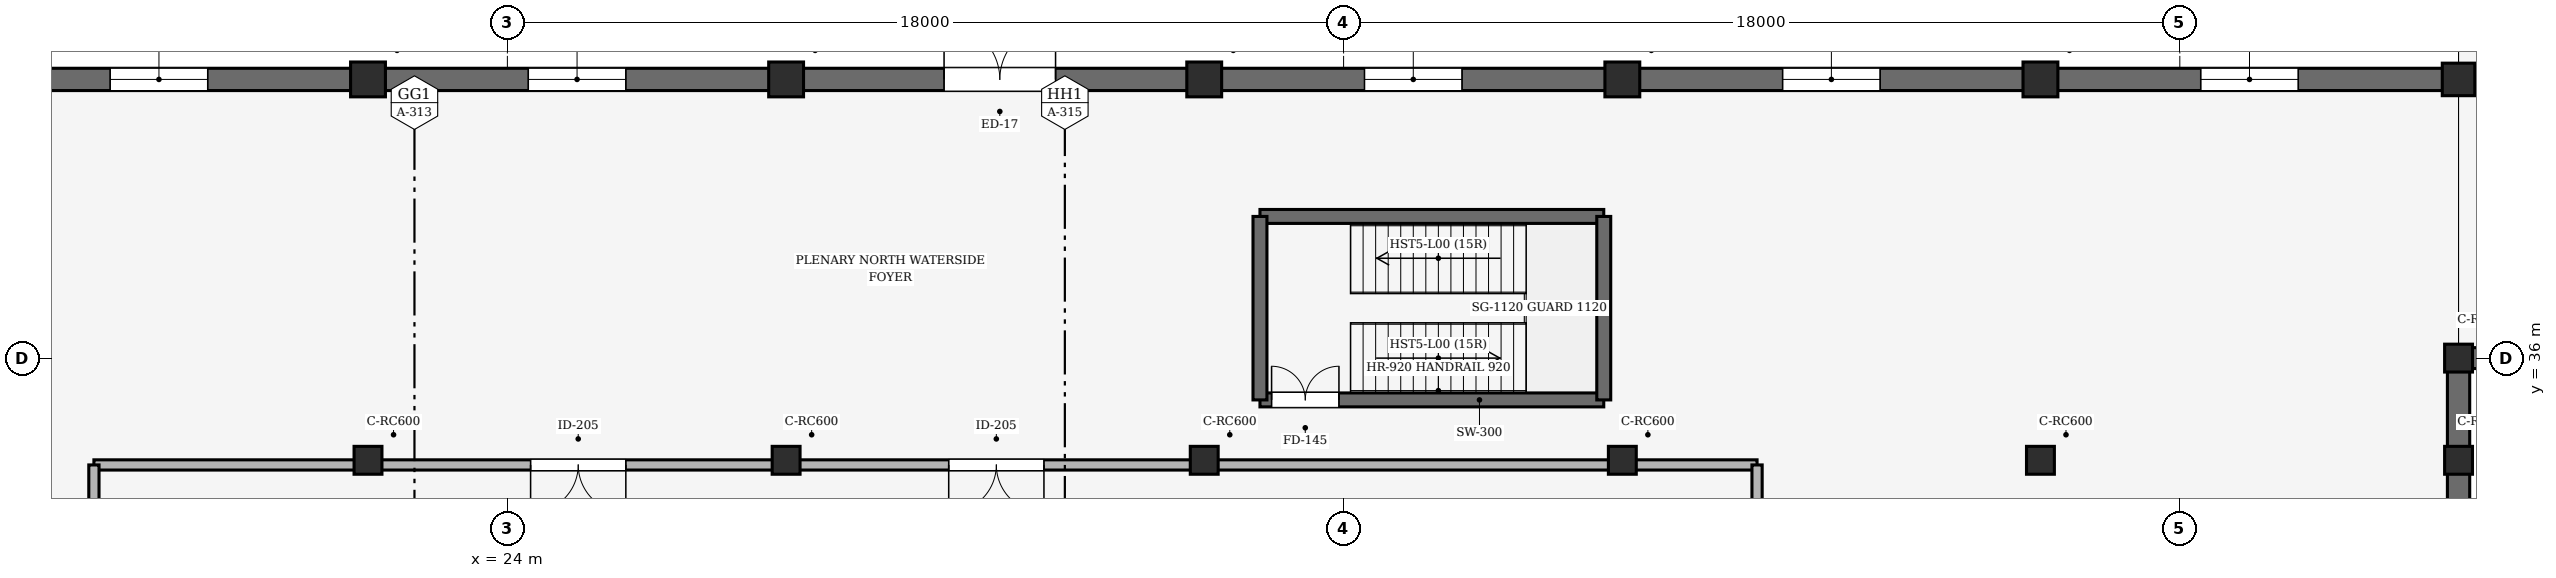
"""IFC4 building model, lengths in metres.
Left out: names, types, materials, properties, quantities, classifications, styles, units other than length and angle.
Written with IfcOpenShell. Run it as: python <this file> out.ifc"""

import sys

from ifc_helpers import new_model, si_unit, direction, frame, frame_2d, origin, origin_2d, place, context, subcontext, project, spatial, rectangle, extrude, element, fill, save


model = new_model("IFC4")
c1 = context("Model", 3, precision=1e-05, world=origin(), true_north=direction((0.0, 1.0)))
c2 = subcontext(c1, "Body", "Model", "MODEL_VIEW")
j1 = project(units=[si_unit("LENGTHUNIT", "METRE"), si_unit("PLANEANGLEUNIT", "RADIAN")], contexts=[c1])
p1 = place(None, origin())
s1 = spatial("IfcSite", under=j1, at=p1, CompositionType="ELEMENT")
p2 = place(p1, origin())
s2 = spatial("IfcBuilding", under=s1, at=p2, CompositionType="ELEMENT")
p3 = place(p2, origin())
s3 = spatial("IfcBuildingStorey", under=s2, at=p3, CompositionType="ELEMENT", Elevation=0.0)
p4 = place(p3, frame((21.0, 42.0, -0.44), z_axis=(0.0, 0.0, 1.0), x_axis=(1.0, 0.0, 0.0)))
e1 = element("IfcColumn", 1, at=p4, inside=s3, PredefinedType="COLUMN", context=c2, shape_type="SweptSolid", body=[
    extrude(rectangle(XDim=0.75, YDim=0.75, at=origin_2d()), origin(), (0.0, 0.0, 1.0), 5.84),
])
p5 = place(p3, frame((21.0, 33.8, -0.44), z_axis=(0.0, 0.0, 1.0), x_axis=(1.0, 0.0, 0.0)))
e2 = element("IfcColumn", 2, at=p5, inside=s3, PredefinedType="COLUMN", context=c2, shape_type="SweptSolid", body=[
    extrude(rectangle(XDim=0.6, YDim=0.6, at=origin_2d()), origin(), (0.0, 0.0, 1.0), 5.84),
])
p6 = place(p3, frame((30.0, 42.0, -0.44), z_axis=(0.0, 0.0, 1.0), x_axis=(1.0, 0.0, 0.0)))
e3 = element("IfcColumn", 3, at=p6, inside=s3, PredefinedType="COLUMN", context=c2, shape_type="SweptSolid", body=[
    extrude(rectangle(XDim=0.75, YDim=0.75, at=origin_2d()), origin(), (0.0, 0.0, 1.0), 5.84),
])
p7 = place(p3, frame((30.0, 33.8, -0.44), z_axis=(0.0, 0.0, 1.0), x_axis=(1.0, 0.0, 0.0)))
e4 = element("IfcColumn", 4, at=p7, inside=s3, PredefinedType="COLUMN", context=c2, shape_type="SweptSolid", body=[
    extrude(rectangle(XDim=0.6, YDim=0.6, at=origin_2d()), origin(), (0.0, 0.0, 1.0), 5.84),
])
p8 = place(p3, frame((39.0, 42.0, -0.44), z_axis=(0.0, 0.0, 1.0), x_axis=(1.0, 0.0, 0.0)))
e5 = element("IfcColumn", 5, at=p8, inside=s3, PredefinedType="COLUMN", context=c2, shape_type="SweptSolid", body=[
    extrude(rectangle(XDim=0.75, YDim=0.75, at=origin_2d()), origin(), (0.0, 0.0, 1.0), 5.84),
])
p9 = place(p3, frame((39.0, 33.8, -0.44), z_axis=(0.0, 0.0, 1.0), x_axis=(1.0, 0.0, 0.0)))
e6 = element("IfcColumn", 6, at=p9, inside=s3, PredefinedType="COLUMN", context=c2, shape_type="SweptSolid", body=[
    extrude(rectangle(XDim=0.6, YDim=0.6, at=origin_2d()), origin(), (0.0, 0.0, 1.0), 5.84),
])
p10 = place(p3, frame((48.0, 42.0, -0.44), z_axis=(0.0, 0.0, 1.0), x_axis=(1.0, 0.0, 0.0)))
e7 = element("IfcColumn", 7, at=p10, inside=s3, PredefinedType="COLUMN", context=c2, shape_type="SweptSolid", body=[
    extrude(rectangle(XDim=0.75, YDim=0.75, at=origin_2d()), origin(), (0.0, 0.0, 1.0), 5.84),
])
p11 = place(p3, frame((48.0, 33.8, -0.44), z_axis=(0.0, 0.0, 1.0), x_axis=(1.0, 0.0, 0.0)))
e8 = element("IfcColumn", 8, at=p11, inside=s3, PredefinedType="COLUMN", context=c2, shape_type="SweptSolid", body=[
    extrude(rectangle(XDim=0.6, YDim=0.6, at=origin_2d()), origin(), (0.0, 0.0, 1.0), 5.84),
])
p12 = place(p3, frame((57.0, 42.0, -0.44), z_axis=(0.0, 0.0, 1.0), x_axis=(1.0, 0.0, 0.0)))
e9 = element("IfcColumn", 9, at=p12, inside=s3, PredefinedType="COLUMN", context=c2, shape_type="SweptSolid", body=[
    extrude(rectangle(XDim=0.75, YDim=0.75, at=origin_2d()), origin(), (0.0, 0.0, 1.0), 5.84),
])
p13 = place(p3, frame((57.0, 33.8, -0.44), z_axis=(0.0, 0.0, 1.0), x_axis=(1.0, 0.0, 0.0)))
e10 = element("IfcColumn", 10, at=p13, inside=s3, PredefinedType="COLUMN", context=c2, shape_type="SweptSolid", body=[
    extrude(rectangle(XDim=0.6, YDim=0.6, at=origin_2d()), origin(), (0.0, 0.0, 1.0), 5.84),
])
p14 = place(p3, frame((66.0, 42.0, -0.44), z_axis=(0.0, 0.0, 1.0), x_axis=(1.0, 0.0, 0.0)))
e11 = element("IfcColumn", 11, at=p14, inside=s3, PredefinedType="COLUMN", context=c2, shape_type="SweptSolid", body=[
    extrude(rectangle(XDim=0.7, YDim=0.7, at=origin_2d()), origin(), (0.0, 0.0, 1.0), 5.84),
])
for number, where, z_axis, x_axis in (
    (12, (66.0, 33.8, -0.44), (0.0, 0.0, 1.0), (1.0, 0.0, 0.0)),
    (13, (66.0, 36.0, -0.44), (0.0, 0.0, 1.0), (1.0, 0.0, 0.0)),
):
    element("IfcColumn", number, at=place(p3, frame(where, z_axis=z_axis, x_axis=x_axis)), inside=s3, PredefinedType="COLUMN", context=c2, shape_type="SweptSolid", body=[
        extrude(rectangle(XDim=0.6, YDim=0.6, at=origin_2d()), origin(), (0.0, 0.0, 1.0), 5.84),
    ])
p15 = place(p3, frame((21.0, 42.0, 0.0), z_axis=(0.0, 0.0, 1.0), x_axis=(-1.0, 0.0, 0.0)))
e14 = element("IfcWall", 14, at=p15, inside=s3, PredefinedType="SOLIDWALL", context=c2, shape_type="SweptSolid", body=[
    extrude(rectangle(XDim=9.0, YDim=0.48, at=frame_2d((4.5, 0.0))), origin(), (0.0, 0.0, 1.0), 4.65),
])
p16 = place(p15, frame((3.45, 0.0, 0.9)))
e15 = element("IfcOpeningElement", 15, at=p16, cuts=e14, PredefinedType="OPENING", context=c2, shape_type="SweptSolid", body=[
    extrude(rectangle(XDim=2.1, YDim=2.95, at=frame_2d((1.05, 1.475))), frame((0.0, 0.25, 0.0), z_axis=(0.0, -1.0, 0.0), x_axis=(1.0, 0.0, 0.0)), (0.0, 0.0, 1.0), 0.5),
])
p17 = place(p3, frame((30.0, 42.0, 0.0), z_axis=(0.0, 0.0, 1.0), x_axis=(-1.0, 0.0, 0.0)))
e16 = element("IfcWall", 16, at=p17, inside=s3, PredefinedType="SOLIDWALL", context=c2, shape_type="SweptSolid", body=[
    extrude(rectangle(XDim=9.0, YDim=0.48, at=frame_2d((4.5, 0.0))), origin(), (0.0, 0.0, 1.0), 4.65),
])
p18 = place(p17, frame((3.45, 0.0, 0.9)))
e17 = element("IfcOpeningElement", 17, at=p18, cuts=e16, PredefinedType="OPENING", context=c2, shape_type="SweptSolid", body=[
    extrude(rectangle(XDim=2.1, YDim=2.95, at=frame_2d((1.05, 1.475))), frame((0.0, 0.25, 0.0), z_axis=(0.0, -1.0, 0.0), x_axis=(1.0, 0.0, 0.0)), (0.0, 0.0, 1.0), 0.5),
])
p19 = place(p3, frame((39.0, 42.0, 0.0), z_axis=(0.0, 0.0, 1.0), x_axis=(-1.0, 0.0, 0.0)))
e18 = element("IfcWall", 18, at=p19, inside=s3, PredefinedType="SOLIDWALL", context=c2, shape_type="SweptSolid", body=[
    extrude(rectangle(XDim=9.0, YDim=0.48, at=frame_2d((4.5, 0.0))), origin(), (0.0, 0.0, 1.0), 4.65),
])
p20 = place(p19, frame((3.2, 0.0, 0.0)))
e19 = element("IfcOpeningElement", 19, at=p20, cuts=e18, PredefinedType="OPENING", context=c2, shape_type="SweptSolid", body=[
    extrude(rectangle(XDim=2.4, YDim=2.65, at=frame_2d((1.2, 1.325))), frame((0.0, 0.25, 0.0), z_axis=(0.0, -1.0, 0.0), x_axis=(1.0, 0.0, 0.0)), (0.0, 0.0, 1.0), 0.5),
])
p21 = place(p3, frame((48.0, 42.0, 0.0), z_axis=(0.0, 0.0, 1.0), x_axis=(-1.0, 0.0, 0.0)))
e20 = element("IfcWall", 20, at=p21, inside=s3, PredefinedType="SOLIDWALL", context=c2, shape_type="SweptSolid", body=[
    extrude(rectangle(XDim=9.0, YDim=0.48, at=frame_2d((4.5, 0.0))), origin(), (0.0, 0.0, 1.0), 4.65),
])
p22 = place(p21, frame((3.45, 0.0, 0.9)))
e21 = element("IfcOpeningElement", 21, at=p22, cuts=e20, PredefinedType="OPENING", context=c2, shape_type="SweptSolid", body=[
    extrude(rectangle(XDim=2.1, YDim=2.95, at=frame_2d((1.05, 1.475))), frame((0.0, 0.25, 0.0), z_axis=(0.0, -1.0, 0.0), x_axis=(1.0, 0.0, 0.0)), (0.0, 0.0, 1.0), 0.5),
])
p23 = place(p3, frame((57.0, 42.0, 0.0), z_axis=(0.0, 0.0, 1.0), x_axis=(-1.0, 0.0, 0.0)))
e22 = element("IfcWall", 22, at=p23, inside=s3, PredefinedType="SOLIDWALL", context=c2, shape_type="SweptSolid", body=[
    extrude(rectangle(XDim=9.0, YDim=0.48, at=frame_2d((4.5, 0.0))), origin(), (0.0, 0.0, 1.0), 4.65),
])
p24 = place(p23, frame((3.45, 0.0, 0.9)))
e23 = element("IfcOpeningElement", 23, at=p24, cuts=e22, PredefinedType="OPENING", context=c2, shape_type="SweptSolid", body=[
    extrude(rectangle(XDim=2.1, YDim=2.95, at=frame_2d((1.05, 1.475))), frame((0.0, 0.25, 0.0), z_axis=(0.0, -1.0, 0.0), x_axis=(1.0, 0.0, 0.0)), (0.0, 0.0, 1.0), 0.5),
])
p25 = place(p3, frame((66.0, 42.0, 0.0), z_axis=(0.0, 0.0, 1.0), x_axis=(-1.0, 0.0, 0.0)))
e24 = element("IfcWall", 24, at=p25, inside=s3, PredefinedType="SOLIDWALL", context=c2, shape_type="SweptSolid", body=[
    extrude(rectangle(XDim=9.0, YDim=0.48, at=frame_2d((4.5, 0.0))), origin(), (0.0, 0.0, 1.0), 4.65),
])
p26 = place(p25, frame((3.45, 0.0, 0.9)))
e25 = element("IfcOpeningElement", 25, at=p26, cuts=e24, PredefinedType="OPENING", context=c2, shape_type="SweptSolid", body=[
    extrude(rectangle(XDim=2.1, YDim=2.95, at=frame_2d((1.05, 1.475))), frame((0.0, 0.25, 0.0), z_axis=(0.0, -1.0, 0.0), x_axis=(1.0, 0.0, 0.0)), (0.0, 0.0, 1.0), 0.5),
])
p27 = place(p3, frame((66.0, 0.0, 0.0), z_axis=(0.0, 0.0, 1.0), x_axis=(0.0, 1.0, 0.0)))
e26 = element("IfcWall", 26, at=p27, inside=s3, PredefinedType="SOLIDWALL", context=c2, shape_type="SweptSolid", body=[
    extrude(rectangle(XDim=36.0, YDim=0.48, at=frame_2d((18.0, 0.0))), origin(), (0.0, 0.0, 1.0), 4.65),
])
p28 = place(p27, frame((16.0, 0.0, 0.0)))
e27 = element("IfcOpeningElement", 27, at=p28, cuts=e26, PredefinedType="OPENING", context=c2, shape_type="SweptSolid", body=[
    extrude(rectangle(XDim=2.0, YDim=2.4, at=frame_2d((1.0, 1.2))), frame((0.0, 0.25, 0.0), z_axis=(0.0, -1.0, 0.0), x_axis=(1.0, 0.0, 0.0)), (0.0, 0.0, 1.0), 0.5),
])
p29 = place(p3, frame((66.0, 36.0, 0.0), z_axis=(0.0, 0.0, 1.0), x_axis=(1.0, 0.0, 0.0)))
e28 = element("IfcWall", 28, at=p29, inside=s3, PredefinedType="SOLIDWALL", context=c2, shape_type="SweptSolid", body=[
    extrude(rectangle(XDim=18.0, YDim=0.45, at=frame_2d((9.0, 0.0))), origin(), (0.0, 0.0, 1.0), 4.65),
])
p30 = place(p3, frame((40.2, 35.1, 0.0), z_axis=(0.0, 0.0, 1.0), x_axis=(1.0, 0.0, 0.0)))
e29 = element("IfcWall", 29, at=p30, inside=s3, PredefinedType="SHEAR", context=c2, shape_type="SweptSolid", body=[
    extrude(rectangle(XDim=7.4, YDim=0.3, at=frame_2d((3.7, 0.0))), origin(), (0.0, 0.0, 1.0), 5.4),
])
p31 = place(p30, frame((0.25, 0.0, 0.0)))
e30 = element("IfcOpeningElement", 30, at=p31, cuts=e29, PredefinedType="OPENING", context=c2, shape_type="SweptSolid", body=[
    extrude(rectangle(XDim=1.45, YDim=2.15, at=frame_2d((0.725, 1.075))), frame((0.0, 0.16, 0.0), z_axis=(0.0, -1.0, 0.0), x_axis=(1.0, 0.0, 0.0)), (0.0, 0.0, 1.0), 0.32),
])
p32 = place(p3, frame((47.6, 39.05, 0.0), z_axis=(0.0, 0.0, 1.0), x_axis=(-1.0, 0.0, 0.0)))
e31 = element("IfcWall", 31, at=p32, inside=s3, PredefinedType="SHEAR", context=c2, shape_type="SweptSolid", body=[
    extrude(rectangle(XDim=7.4, YDim=0.3, at=frame_2d((3.7, 0.0))), origin(), (0.0, 0.0, 1.0), 5.4),
])
for number, where, z_axis, x_axis in (
    (32, (40.2, 39.05, 0.0), (0.0, 0.0, 1.0), (0.0, -1.0, 0.0)),
    (33, (47.6, 35.1, 0.0), (0.0, 0.0, 1.0), (0.0, 1.0, 0.0)),
):
    element("IfcWall", number, at=place(p3, frame(where, z_axis=z_axis, x_axis=x_axis)), inside=s3, PredefinedType="SHEAR", context=c2, shape_type="SweptSolid", body=[
        extrude(rectangle(XDim=3.95, YDim=0.3, at=frame_2d((1.975, 0.0))), origin(), (0.0, 0.0, 1.0), 5.4),
    ])
p33 = place(p3, frame((50.9, 33.7, 0.0), z_axis=(0.0, 0.0, 1.0), x_axis=(-1.0, 0.0, 0.0)))
e34 = element("IfcWall", 34, at=p33, inside=s3, PredefinedType="SOLIDWALL", context=c2, shape_type="SweptSolid", body=[
    extrude(rectangle(XDim=35.8, YDim=0.22, at=frame_2d((17.9, 0.0))), origin(), (0.0, 0.0, 1.0), 4.1),
])
p34 = place(p33, frame((15.35, 0.0, 0.0)))
e35 = element("IfcOpeningElement", 35, at=p34, cuts=e34, PredefinedType="OPENING", context=c2, shape_type="SweptSolid", body=[
    extrude(rectangle(XDim=2.05, YDim=2.3, at=frame_2d((1.025, 1.15))), frame((0.0, 0.12, 0.0), z_axis=(0.0, -1.0, 0.0), x_axis=(1.0, 0.0, 0.0)), (0.0, 0.0, 1.0), 0.24),
])
p35 = place(p33, frame((24.35, 0.0, 0.0)))
e36 = element("IfcOpeningElement", 36, at=p35, cuts=e34, PredefinedType="OPENING", context=c2, shape_type="SweptSolid", body=[
    extrude(rectangle(XDim=2.05, YDim=2.3, at=frame_2d((1.025, 1.15))), frame((0.0, 0.12, 0.0), z_axis=(0.0, -1.0, 0.0), x_axis=(1.0, 0.0, 0.0)), (0.0, 0.0, 1.0), 0.24),
])
p36 = place(p3, frame((50.9, 10.3, 0.0), z_axis=(0.0, 0.0, 1.0), x_axis=(0.0, 1.0, 0.0)))
e37 = element("IfcWall", 37, at=p36, inside=s3, PredefinedType="SOLIDWALL", context=c2, shape_type="SweptSolid", body=[
    extrude(rectangle(XDim=23.4, YDim=0.22, at=frame_2d((11.7, 0.0))), origin(), (0.0, 0.0, 1.0), 4.1),
])
p37 = place(p36, frame((10.5, 0.0, 0.0)))
e38 = element("IfcOpeningElement", 38, at=p37, cuts=e37, PredefinedType="OPENING", context=c2, shape_type="SweptSolid", body=[
    extrude(rectangle(XDim=2.05, YDim=2.3, at=frame_2d((1.025, 1.15))), frame((0.0, 0.12, 0.0), z_axis=(0.0, -1.0, 0.0), x_axis=(1.0, 0.0, 0.0)), (0.0, 0.0, 1.0), 0.24),
])
p38 = place(p3, frame((15.1, 33.7, 0.0), z_axis=(0.0, 0.0, 1.0), x_axis=(0.0, -1.0, 0.0)))
e39 = element("IfcWall", 39, at=p38, inside=s3, PredefinedType="SOLIDWALL", context=c2, shape_type="SweptSolid", body=[
    extrude(rectangle(XDim=23.4, YDim=0.22, at=frame_2d((11.7, 0.0))), origin(), (0.0, 0.0, 1.0), 4.1),
])
p39 = place(p38, frame((10.5, 0.0, 0.0)))
e40 = element("IfcOpeningElement", 40, at=p39, cuts=e39, PredefinedType="OPENING", context=c2, shape_type="SweptSolid", body=[
    extrude(rectangle(XDim=1.6, YDim=2.2, at=frame_2d((0.8, 1.1))), frame((0.0, 0.12, 0.0), z_axis=(0.0, -1.0, 0.0), x_axis=(1.0, 0.0, 0.0)), (0.0, 0.0, 1.0), 0.24),
])
p40 = place(p16, origin())
e41 = element("IfcWindow", 41, at=p40, inside=s3, PartitioningType="DOUBLE_PANEL_VERTICAL", PredefinedType="WINDOW", context=c2, shape_type="SweptSolid", body=[
    extrude(rectangle(XDim=2.1, YDim=2.95, at=frame_2d((1.05, 1.475))), frame((0.0, 0.03, 0.0), z_axis=(0.0, -1.0, 0.0), x_axis=(1.0, 0.0, 0.0)), (0.0, 0.0, 1.0), 0.06),
])
fill(e15, e41)
p41 = place(p18, origin())
e42 = element("IfcWindow", 42, at=p41, inside=s3, PartitioningType="DOUBLE_PANEL_VERTICAL", PredefinedType="WINDOW", context=c2, shape_type="SweptSolid", body=[
    extrude(rectangle(XDim=2.1, YDim=2.95, at=frame_2d((1.05, 1.475))), frame((0.0, 0.03, 0.0), z_axis=(0.0, -1.0, 0.0), x_axis=(1.0, 0.0, 0.0)), (0.0, 0.0, 1.0), 0.06),
])
fill(e17, e42)
p42 = place(p20, frame((2.4, 0.0, 0.0), z_axis=(0.0, 0.0, 1.0), x_axis=(-1.0, 0.0, 0.0)))
e43 = element("IfcDoor", 43, at=p42, inside=s3, OperationType="DOUBLE_DOOR_SINGLE_SWING", PredefinedType="DOOR", context=c2, shape_type="SweptSolid", body=[
    extrude(rectangle(XDim=2.4, YDim=2.65, at=frame_2d((1.2, 1.325))), frame((0.0, 0.025, 0.0), z_axis=(0.0, -1.0, 0.0), x_axis=(1.0, 0.0, 0.0)), (0.0, 0.0, 1.0), 0.05),
])
fill(e19, e43)
p43 = place(p22, origin())
e44 = element("IfcWindow", 44, at=p43, inside=s3, PartitioningType="DOUBLE_PANEL_VERTICAL", PredefinedType="WINDOW", context=c2, shape_type="SweptSolid", body=[
    extrude(rectangle(XDim=2.1, YDim=2.95, at=frame_2d((1.05, 1.475))), frame((0.0, 0.03, 0.0), z_axis=(0.0, -1.0, 0.0), x_axis=(1.0, 0.0, 0.0)), (0.0, 0.0, 1.0), 0.06),
])
fill(e21, e44)
p44 = place(p24, origin())
e45 = element("IfcWindow", 45, at=p44, inside=s3, PartitioningType="DOUBLE_PANEL_VERTICAL", PredefinedType="WINDOW", context=c2, shape_type="SweptSolid", body=[
    extrude(rectangle(XDim=2.1, YDim=2.95, at=frame_2d((1.05, 1.475))), frame((0.0, 0.03, 0.0), z_axis=(0.0, -1.0, 0.0), x_axis=(1.0, 0.0, 0.0)), (0.0, 0.0, 1.0), 0.06),
])
fill(e23, e45)
p45 = place(p26, origin())
e46 = element("IfcWindow", 46, at=p45, inside=s3, PartitioningType="DOUBLE_PANEL_VERTICAL", PredefinedType="WINDOW", context=c2, shape_type="SweptSolid", body=[
    extrude(rectangle(XDim=2.1, YDim=2.95, at=frame_2d((1.05, 1.475))), frame((0.0, 0.03, 0.0), z_axis=(0.0, -1.0, 0.0), x_axis=(1.0, 0.0, 0.0)), (0.0, 0.0, 1.0), 0.06),
])
fill(e25, e46)
p46 = place(p31, origin())
e47 = element("IfcDoor", 47, at=p46, inside=s3, OperationType="DOUBLE_DOOR_SINGLE_SWING", PredefinedType="DOOR", context=c2, shape_type="SweptSolid", body=[
    extrude(rectangle(XDim=1.45, YDim=2.15, at=frame_2d((0.725, 1.075))), frame((0.0, 0.025, 0.0), z_axis=(0.0, -1.0, 0.0), x_axis=(1.0, 0.0, 0.0)), (0.0, 0.0, 1.0), 0.05),
])
fill(e30, e47)
p47 = place(p34, origin())
e48 = element("IfcDoor", 48, at=p47, inside=s3, OperationType="DOUBLE_DOOR_SINGLE_SWING", PredefinedType="DOOR", context=c2, shape_type="SweptSolid", body=[
    extrude(rectangle(XDim=2.05, YDim=2.3, at=frame_2d((1.025, 1.15))), frame((0.0, 0.025, 0.0), z_axis=(0.0, -1.0, 0.0), x_axis=(1.0, 0.0, 0.0)), (0.0, 0.0, 1.0), 0.05),
])
fill(e35, e48)
p48 = place(p35, origin())
e49 = element("IfcDoor", 49, at=p48, inside=s3, OperationType="DOUBLE_DOOR_SINGLE_SWING", PredefinedType="DOOR", context=c2, shape_type="SweptSolid", body=[
    extrude(rectangle(XDim=2.05, YDim=2.3, at=frame_2d((1.025, 1.15))), frame((0.0, 0.025, 0.0), z_axis=(0.0, -1.0, 0.0), x_axis=(1.0, 0.0, 0.0)), (0.0, 0.0, 1.0), 0.05),
])
fill(e36, e49)
save(model, sys.argv[1])
